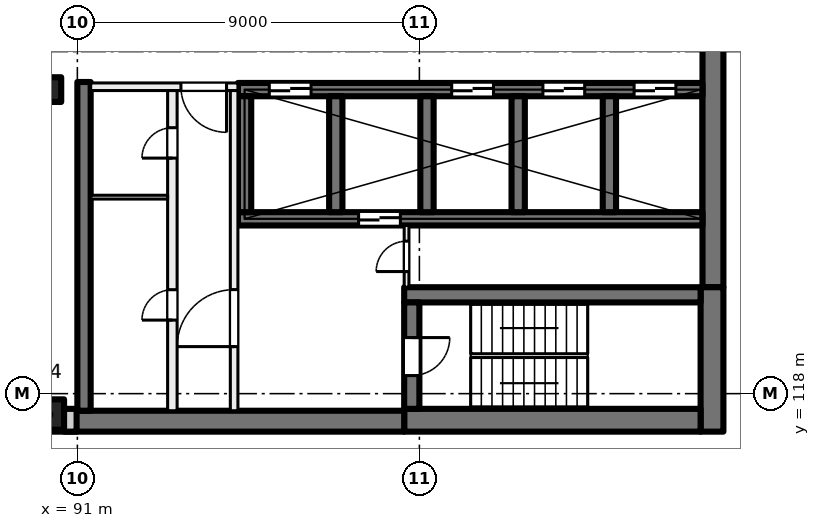
"""IFC4 building model, lengths in metres.
Left out: names, types, materials, properties, quantities, classifications, styles, units other than length and angle.
Written with IfcOpenShell. Run it as: python <this file> out.ifc"""

import sys

from ifc_helpers import new_model, si_unit, direction, frame, frame_2d, origin, origin_2d, place, context, subcontext, project, spatial, rectangle, extrude, element, fill, save


model = new_model("IFC4")
c1 = context("Model", 3, precision=1e-05, world=origin(), true_north=direction((0.0, 1.0)))
c2 = subcontext(c1, "Body", "Model", "MODEL_VIEW")
j1 = project(units=[si_unit("LENGTHUNIT", "METRE"), si_unit("PLANEANGLEUNIT", "RADIAN")], contexts=[c1])
p1 = place(None, origin())
s1 = spatial("IfcSite", under=j1, at=p1, CompositionType="ELEMENT")
p2 = place(p1, origin())
s2 = spatial("IfcBuilding", under=s1, at=p2, CompositionType="ELEMENT")
p3 = place(p2, frame((0.0, 0.0, 154.5)))
s3 = spatial("IfcBuildingStorey", under=s2, at=p3, CompositionType="ELEMENT", Elevation=154.5)
p4 = place(p3, frame((90.25, 126.0, 0.0), z_axis=(0.0, 0.0, 1.0), x_axis=(1.0, 0.0, 0.0)))
e1 = element("IfcColumn", 1, at=p4, inside=s3, PredefinedType="COLUMN", context=c2, shape_type="SweptSolid", body=[
    extrude(rectangle(XDim=0.65, YDim=0.65, at=origin_2d()), origin(), (0.0, 0.0, 1.0), 4.0),
])
p5 = place(p3, frame((90.25, 117.45, 0.0), z_axis=(0.0, 0.0, 1.0), x_axis=(1.0, 0.0, 0.0)))
e2 = element("IfcColumn", 2, at=p5, inside=s3, PredefinedType="COLUMN", context=c2, shape_type="SweptSolid", body=[
    extrude(rectangle(XDim=0.8, YDim=0.8, at=origin_2d()), origin(), (0.0, 0.0, 1.0), 4.0),
])
p6 = place(p3, frame((107.725, 135.2, 0.0), z_axis=(0.0, 0.0, 1.0), x_axis=(0.0, -1.0, 0.0)))
e3 = element("IfcWall", 3, at=p6, inside=s3, PredefinedType="SHEAR", context=c2, shape_type="SweptSolid", body=[
    extrude(rectangle(XDim=14.4, YDim=0.55, at=frame_2d((7.2, 0.0))), origin(), (0.0, 0.0, 1.0), 4.0),
])
p7 = place(p3, frame((107.7, 120.8, 0.0), z_axis=(0.0, 0.0, 1.0), x_axis=(0.0, -1.0, 0.0)))
e4 = element("IfcWall", 4, at=p7, inside=s3, PredefinedType="SHEAR", context=c2, shape_type="SweptSolid", body=[
    extrude(rectangle(XDim=3.8, YDim=0.6, at=frame_2d((1.9, 0.0))), origin(), (0.0, 0.0, 1.0), 4.0),
])
p8 = place(p3, frame((107.4, 117.3, 0.0), z_axis=(0.0, 0.0, 1.0), x_axis=(-1.0, 0.0, 0.0)))
e5 = element("IfcWall", 5, at=p8, inside=s3, PredefinedType="SHEAR", context=c2, shape_type="SweptSolid", body=[
    extrude(rectangle(XDim=7.8, YDim=0.6, at=frame_2d((3.9, 0.0))), origin(), (0.0, 0.0, 1.0), 4.0),
])
p9 = place(p3, frame((99.6, 117.275, 0.0), z_axis=(0.0, 0.0, 1.0), x_axis=(-1.0, 0.0, 0.0)))
e6 = element("IfcWall", 6, at=p9, inside=s3, PredefinedType="SHEAR", context=c2, shape_type="SweptSolid", body=[
    extrude(rectangle(XDim=8.95, YDim=0.55, at=frame_2d((4.475, 0.0))), origin(), (0.0, 0.0, 1.0), 4.0),
])
p10 = place(p3, frame((107.4, 120.6, 0.0), z_axis=(0.0, 0.0, 1.0), x_axis=(-1.0, 0.0, 0.0)))
e7 = element("IfcWall", 7, at=p10, inside=s3, PredefinedType="SHEAR", context=c2, shape_type="SweptSolid", body=[
    extrude(rectangle(XDim=7.8, YDim=0.4, at=frame_2d((3.9, 0.0))), origin(), (0.0, 0.0, 1.0), 4.0),
])
p11 = place(p3, frame((99.8, 120.4, 0.0), z_axis=(0.0, 0.0, 1.0), x_axis=(0.0, -1.0, 0.0)))
e8 = element("IfcWall", 8, at=p11, inside=s3, PredefinedType="SHEAR", context=c2, shape_type="SweptSolid", body=[
    extrude(rectangle(XDim=2.8, YDim=0.4, at=frame_2d((1.4, 0.0))), origin(), (0.0, 0.0, 1.0), 4.0),
])
p12 = place(p11, frame((0.925, 0.0, 0.0)))
e9 = element("IfcOpeningElement", 9, at=p12, cuts=e8, PredefinedType="OPENING", context=c2, shape_type="SweptSolid", body=[
    extrude(rectangle(XDim=1.0, YDim=2.1, at=frame_2d((0.5, 1.05))), frame((0.0, 0.21, 0.0), z_axis=(0.0, -1.0, 0.0), x_axis=(1.0, 0.0, 0.0)), (0.0, 0.0, 1.0), 0.42),
])
p13 = place(p3, frame((107.45, 126.0, 0.0), z_axis=(0.0, 0.0, 1.0), x_axis=(-1.0, 0.0, 0.0)))
e10 = element("IfcWall", 10, at=p13, inside=s3, PredefinedType="SHEAR", context=c2, shape_type="SweptSolid", body=[
    extrude(rectangle(XDim=12.225, YDim=0.35, at=frame_2d((6.112, 0.0))), origin(), (0.0, 0.0, 1.0), 4.0),
])
p14 = place(p13, frame((0.7, 0.0, 0.0)))
e11 = element("IfcOpeningElement", 11, at=p14, cuts=e10, PredefinedType="OPENING", context=c2, shape_type="SweptSolid", body=[
    extrude(rectangle(XDim=1.1, YDim=2.1, at=frame_2d((0.55, 1.05))), frame((0.0, 0.185, 0.0), z_axis=(0.0, -1.0, 0.0), x_axis=(1.0, 0.0, 0.0)), (0.0, 0.0, 1.0), 0.37),
])
p15 = place(p13, frame((3.1, 0.0, 0.0)))
e12 = element("IfcOpeningElement", 12, at=p15, cuts=e10, PredefinedType="OPENING", context=c2, shape_type="SweptSolid", body=[
    extrude(rectangle(XDim=1.1, YDim=2.1, at=frame_2d((0.55, 1.05))), frame((0.0, 0.185, 0.0), z_axis=(0.0, -1.0, 0.0), x_axis=(1.0, 0.0, 0.0)), (0.0, 0.0, 1.0), 0.37),
])
p16 = place(p13, frame((5.5, 0.0, 0.0)))
e13 = element("IfcOpeningElement", 13, at=p16, cuts=e10, PredefinedType="OPENING", context=c2, shape_type="SweptSolid", body=[
    extrude(rectangle(XDim=1.1, YDim=2.1, at=frame_2d((0.55, 1.05))), frame((0.0, 0.185, 0.0), z_axis=(0.0, -1.0, 0.0), x_axis=(1.0, 0.0, 0.0)), (0.0, 0.0, 1.0), 0.37),
])
p17 = place(p13, frame((10.3, 0.0, 0.0)))
e14 = element("IfcOpeningElement", 14, at=p17, cuts=e10, PredefinedType="OPENING", context=c2, shape_type="SweptSolid", body=[
    extrude(rectangle(XDim=1.1, YDim=2.1, at=frame_2d((0.55, 1.05))), frame((0.0, 0.185, 0.0), z_axis=(0.0, -1.0, 0.0), x_axis=(1.0, 0.0, 0.0)), (0.0, 0.0, 1.0), 0.37),
])
p18 = place(p3, frame((107.45, 122.6, 0.0), z_axis=(0.0, 0.0, 1.0), x_axis=(-1.0, 0.0, 0.0)))
e15 = element("IfcWall", 15, at=p18, inside=s3, PredefinedType="SHEAR", context=c2, shape_type="SweptSolid", body=[
    extrude(rectangle(XDim=12.225, YDim=0.35, at=frame_2d((6.112, 0.0))), origin(), (0.0, 0.0, 1.0), 4.0),
])
p19 = place(p18, frame((7.95, 0.0, 0.0)))
e16 = element("IfcOpeningElement", 16, at=p19, cuts=e15, PredefinedType="OPENING", context=c2, shape_type="SweptSolid", body=[
    extrude(rectangle(XDim=1.1, YDim=2.1, at=frame_2d((0.55, 1.05))), frame((0.0, 0.185, 0.0), z_axis=(0.0, -1.0, 0.0), x_axis=(1.0, 0.0, 0.0)), (0.0, 0.0, 1.0), 0.37),
])
for number, where, z_axis, x_axis in (
    (17, (105.0, 125.825, 0.0), (0.0, 0.0, 1.0), (0.0, -1.0, 0.0)),
    (18, (102.6, 125.825, 0.0), (0.0, 0.0, 1.0), (0.0, -1.0, 0.0)),
    (19, (100.2, 125.825, 0.0), (0.0, 0.0, 1.0), (0.0, -1.0, 0.0)),
    (20, (97.8, 125.825, 0.0), (0.0, 0.0, 1.0), (0.0, -1.0, 0.0)),
    (21, (95.4, 125.825, 0.0), (0.0, 0.0, 1.0), (0.0, -1.0, 0.0)),
):
    element("IfcWall", number, at=place(p3, frame(where, z_axis=z_axis, x_axis=x_axis)), inside=s3, PredefinedType="SHEAR", context=c2, shape_type="SweptSolid", body=[
        extrude(rectangle(XDim=3.05, YDim=0.35, at=frame_2d((1.525, 0.0))), origin(), (0.0, 0.0, 1.0), 4.0),
    ])
p20 = place(p3, frame((91.175, 126.2, 0.0), z_axis=(0.0, 0.0, 1.0), x_axis=(0.0, -1.0, 0.0)))
e22 = element("IfcWall", 22, at=p20, inside=s3, PredefinedType="SHEAR", context=c2, shape_type="SweptSolid", body=[
    extrude(rectangle(XDim=8.65, YDim=0.35, at=frame_2d((4.325, 0.0))), origin(), (0.0, 0.0, 1.0), 4.0),
])
p21 = place(p3, frame((90.98, 117.3, 0.0), z_axis=(0.0, 0.0, 1.0), x_axis=(-1.0, 0.0, 0.0)))
e23 = element("IfcWall", 23, at=p21, inside=s3, PredefinedType="SOLIDWALL", context=c2, shape_type="SweptSolid", body=[
    extrude(rectangle(XDim=33.745, YDim=0.6, at=frame_2d((16.873, 0.0))), origin(), (0.0, 0.0, 1.0), 3.625),
])
p22 = place(p21, frame((1.48, 0.0, 0.9)))
e24 = element("IfcOpeningElement", 24, at=p22, cuts=e23, PredefinedType="OPENING", context=c2, shape_type="SweptSolid", body=[
    extrude(rectangle(XDim=3.0, YDim=2.4, at=frame_2d((1.5, 1.2))), frame((0.0, 0.31, 0.0), z_axis=(0.0, -1.0, 0.0), x_axis=(1.0, 0.0, 0.0)), (0.0, 0.0, 1.0), 0.62),
])
p23 = place(p21, frame((5.98, 0.0, 0.9)))
e25 = element("IfcOpeningElement", 25, at=p23, cuts=e23, PredefinedType="OPENING", context=c2, shape_type="SweptSolid", body=[
    extrude(rectangle(XDim=3.0, YDim=2.4, at=frame_2d((1.5, 1.2))), frame((0.0, 0.31, 0.0), z_axis=(0.0, -1.0, 0.0), x_axis=(1.0, 0.0, 0.0)), (0.0, 0.0, 1.0), 0.62),
])
p24 = place(p21, frame((10.48, 0.0, 0.9)))
e26 = element("IfcOpeningElement", 26, at=p24, cuts=e23, PredefinedType="OPENING", context=c2, shape_type="SweptSolid", body=[
    extrude(rectangle(XDim=3.0, YDim=2.4, at=frame_2d((1.5, 1.2))), frame((0.0, 0.31, 0.0), z_axis=(0.0, -1.0, 0.0), x_axis=(1.0, 0.0, 0.0)), (0.0, 0.0, 1.0), 0.62),
])
p25 = place(p21, frame((14.98, 0.0, 0.9)))
e27 = element("IfcOpeningElement", 27, at=p25, cuts=e23, PredefinedType="OPENING", context=c2, shape_type="SweptSolid", body=[
    extrude(rectangle(XDim=3.0, YDim=2.4, at=frame_2d((1.5, 1.2))), frame((0.0, 0.31, 0.0), z_axis=(0.0, -1.0, 0.0), x_axis=(1.0, 0.0, 0.0)), (0.0, 0.0, 1.0), 0.62),
])
p26 = place(p21, frame((19.48, 0.0, 0.9)))
e28 = element("IfcOpeningElement", 28, at=p26, cuts=e23, PredefinedType="OPENING", context=c2, shape_type="SweptSolid", body=[
    extrude(rectangle(XDim=3.0, YDim=2.4, at=frame_2d((1.5, 1.2))), frame((0.0, 0.31, 0.0), z_axis=(0.0, -1.0, 0.0), x_axis=(1.0, 0.0, 0.0)), (0.0, 0.0, 1.0), 0.62),
])
p27 = place(p21, frame((24.58, 0.0, 0.0)))
e29 = element("IfcOpeningElement", 29, at=p27, cuts=e23, PredefinedType="OPENING", context=c2, shape_type="SweptSolid", body=[
    extrude(rectangle(XDim=1.8, YDim=2.4, at=frame_2d((0.9, 1.2))), frame((0.0, 0.31, 0.0), z_axis=(0.0, -1.0, 0.0), x_axis=(1.0, 0.0, 0.0)), (0.0, 0.0, 1.0), 0.62),
])
p28 = place(p21, frame((28.48, 0.0, 0.9)))
e30 = element("IfcOpeningElement", 30, at=p28, cuts=e23, PredefinedType="OPENING", context=c2, shape_type="SweptSolid", body=[
    extrude(rectangle(XDim=3.0, YDim=2.4, at=frame_2d((1.5, 1.2))), frame((0.0, 0.31, 0.0), z_axis=(0.0, -1.0, 0.0), x_axis=(1.0, 0.0, 0.0)), (0.0, 0.0, 1.0), 0.62),
])
p29 = place(p3, frame((95.225, 126.075, 0.0), z_axis=(0.0, 0.0, 1.0), x_axis=(-1.0, 0.0, 0.0)))
e31 = element("IfcWall", 31, at=p29, inside=s3, PredefinedType="PARTITIONING", context=c2, shape_type="SweptSolid", body=[
    extrude(rectangle(XDim=3.875, YDim=0.2, at=frame_2d((1.938, 0.0))), origin(), (0.0, 0.0, 1.0), 3.625),
])
p30 = place(p29, frame((0.3, 0.0, 0.0)))
e32 = element("IfcOpeningElement", 32, at=p30, cuts=e31, PredefinedType="OPENING", context=c2, shape_type="SweptSolid", body=[
    extrude(rectangle(XDim=1.2, YDim=2.1, at=frame_2d((0.6, 1.05))), frame((0.0, 0.11, 0.0), z_axis=(0.0, -1.0, 0.0), x_axis=(1.0, 0.0, 0.0)), (0.0, 0.0, 1.0), 0.22),
])
p31 = place(p3, frame((95.125, 117.55, 0.0), z_axis=(0.0, 0.0, 1.0), x_axis=(0.0, 1.0, 0.0)))
e33 = element("IfcWall", 33, at=p31, inside=s3, PredefinedType="PARTITIONING", context=c2, shape_type="SweptSolid", body=[
    extrude(rectangle(XDim=8.425, YDim=0.2, at=frame_2d((4.212, 0.0))), origin(), (0.0, 0.0, 1.0), 3.625),
])
p32 = place(p31, frame((1.688, 0.0, 0.0)))
e34 = element("IfcOpeningElement", 34, at=p32, cuts=e33, PredefinedType="OPENING", context=c2, shape_type="SweptSolid", body=[
    extrude(rectangle(XDim=1.5, YDim=2.1, at=frame_2d((0.75, 1.05))), frame((0.0, 0.11, 0.0), z_axis=(0.0, -1.0, 0.0), x_axis=(1.0, 0.0, 0.0)), (0.0, 0.0, 1.0), 0.22),
])
p33 = place(p3, frame((93.5, 117.55, 0.0), z_axis=(0.0, 0.0, 1.0), x_axis=(0.0, 1.0, 0.0)))
e35 = element("IfcWall", 35, at=p33, inside=s3, PredefinedType="PARTITIONING", context=c2, shape_type="SweptSolid", body=[
    extrude(rectangle(XDim=8.425, YDim=0.25, at=frame_2d((4.212, 0.0))), origin(), (0.0, 0.0, 1.0), 3.625),
])
p34 = place(p33, frame((6.647, 0.0, 0.0)))
e36 = element("IfcOpeningElement", 36, at=p34, cuts=e35, PredefinedType="OPENING", context=c2, shape_type="SweptSolid", body=[
    extrude(rectangle(XDim=0.8, YDim=2.1, at=frame_2d((0.4, 1.05))), frame((0.0, 0.135, 0.0), z_axis=(0.0, -1.0, 0.0), x_axis=(1.0, 0.0, 0.0)), (0.0, 0.0, 1.0), 0.27),
])
p35 = place(p33, frame((2.385, 0.0, 0.0)))
e37 = element("IfcOpeningElement", 37, at=p35, cuts=e35, PredefinedType="OPENING", context=c2, shape_type="SweptSolid", body=[
    extrude(rectangle(XDim=0.8, YDim=2.1, at=frame_2d((0.4, 1.05))), frame((0.0, 0.135, 0.0), z_axis=(0.0, -1.0, 0.0), x_axis=(1.0, 0.0, 0.0)), (0.0, 0.0, 1.0), 0.27),
])
p36 = place(p3, frame((99.663, 120.8, 0.0), z_axis=(0.0, 0.0, 1.0), x_axis=(0.0, 1.0, 0.0)))
e38 = element("IfcWall", 38, at=p36, inside=s3, PredefinedType="PARTITIONING", context=c2, shape_type="SweptSolid", body=[
    extrude(rectangle(XDim=1.625, YDim=0.125, at=frame_2d((0.812, 0.0))), origin(), (0.0, 0.0, 1.0), 3.625),
])
p37 = place(p36, frame((0.413, 0.0, 0.0)))
e39 = element("IfcOpeningElement", 39, at=p37, cuts=e38, PredefinedType="OPENING", context=c2, shape_type="SweptSolid", body=[
    extrude(rectangle(XDim=0.8, YDim=2.1, at=frame_2d((0.4, 1.05))), frame((0.0, 0.073, 0.0), z_axis=(0.0, -1.0, 0.0), x_axis=(1.0, 0.0, 0.0)), (0.0, 0.0, 1.0), 0.145),
])
p38 = place(p3, frame((93.375, 123.17, 0.0), z_axis=(0.0, 0.0, 1.0), x_axis=(-1.0, 0.0, 0.0)))
e40 = element("IfcWall", 40, at=p38, inside=s3, PredefinedType="PARTITIONING", context=c2, shape_type="SweptSolid", body=[
    extrude(rectangle(XDim=2.025, YDim=0.1, at=frame_2d((1.012, 0.0))), origin(), (0.0, 0.0, 1.0), 3.625),
])
p39 = place(p14, origin())
e41 = element("IfcDoor", 41, at=p39, inside=s3, OperationType="DOUBLE_DOOR_SLIDING", PredefinedType="DOOR", context=c2, shape_type="SweptSolid", body=[
    extrude(rectangle(XDim=1.1, YDim=2.1, at=frame_2d((0.55, 1.05))), frame((0.0, 0.025, 0.0), z_axis=(0.0, -1.0, 0.0), x_axis=(1.0, 0.0, 0.0)), (0.0, 0.0, 1.0), 0.05),
])
fill(e11, e41)
p40 = place(p15, origin())
e42 = element("IfcDoor", 42, at=p40, inside=s3, OperationType="DOUBLE_DOOR_SLIDING", PredefinedType="DOOR", context=c2, shape_type="SweptSolid", body=[
    extrude(rectangle(XDim=1.1, YDim=2.1, at=frame_2d((0.55, 1.05))), frame((0.0, 0.025, 0.0), z_axis=(0.0, -1.0, 0.0), x_axis=(1.0, 0.0, 0.0)), (0.0, 0.0, 1.0), 0.05),
])
fill(e12, e42)
p41 = place(p16, origin())
e43 = element("IfcDoor", 43, at=p41, inside=s3, OperationType="DOUBLE_DOOR_SLIDING", PredefinedType="DOOR", context=c2, shape_type="SweptSolid", body=[
    extrude(rectangle(XDim=1.1, YDim=2.1, at=frame_2d((0.55, 1.05))), frame((0.0, 0.025, 0.0), z_axis=(0.0, -1.0, 0.0), x_axis=(1.0, 0.0, 0.0)), (0.0, 0.0, 1.0), 0.05),
])
fill(e13, e43)
p42 = place(p17, origin())
e44 = element("IfcDoor", 44, at=p42, inside=s3, OperationType="DOUBLE_DOOR_SLIDING", PredefinedType="DOOR", context=c2, shape_type="SweptSolid", body=[
    extrude(rectangle(XDim=1.1, YDim=2.1, at=frame_2d((0.55, 1.05))), frame((0.0, 0.025, 0.0), z_axis=(0.0, -1.0, 0.0), x_axis=(1.0, 0.0, 0.0)), (0.0, 0.0, 1.0), 0.05),
])
fill(e14, e44)
p43 = place(p30, origin())
e45 = element("IfcDoor", 45, at=p43, inside=s3, OperationType="DOUBLE_DOOR_SINGLE_SWING", PredefinedType="DOOR", context=c2, shape_type="SweptSolid", body=[
    extrude(rectangle(XDim=1.2, YDim=2.1, at=frame_2d((0.6, 1.05))), frame((0.0, 0.025, 0.0), z_axis=(0.0, -1.0, 0.0), x_axis=(1.0, 0.0, 0.0)), (0.0, 0.0, 1.0), 0.05),
])
fill(e32, e45)
p44 = place(p32, origin())
e46 = element("IfcDoor", 46, at=p44, inside=s3, OperationType="DOUBLE_DOOR_SINGLE_SWING", PredefinedType="DOOR", context=c2, shape_type="SweptSolid", body=[
    extrude(rectangle(XDim=1.5, YDim=2.1, at=frame_2d((0.75, 1.05))), frame((0.0, 0.025, 0.0), z_axis=(0.0, -1.0, 0.0), x_axis=(1.0, 0.0, 0.0)), (0.0, 0.0, 1.0), 0.05),
])
fill(e34, e46)
p45 = place(p12, origin())
e47 = element("IfcDoor", 47, at=p45, inside=s3, OperationType="SINGLE_SWING_LEFT", PredefinedType="DOOR", context=c2, shape_type="SweptSolid", body=[
    extrude(rectangle(XDim=1.0, YDim=2.1, at=frame_2d((0.5, 1.05))), frame((0.0, 0.025, 0.0), z_axis=(0.0, -1.0, 0.0), x_axis=(1.0, 0.0, 0.0)), (0.0, 0.0, 1.0), 0.05),
])
fill(e9, e47)
p46 = place(p37, origin())
e48 = element("IfcDoor", 48, at=p46, inside=s3, OperationType="SINGLE_SWING_RIGHT", PredefinedType="DOOR", context=c2, shape_type="SweptSolid", body=[
    extrude(rectangle(XDim=0.8, YDim=2.1, at=frame_2d((0.4, 1.05))), frame((0.0, 0.025, 0.0), z_axis=(0.0, -1.0, 0.0), x_axis=(1.0, 0.0, 0.0)), (0.0, 0.0, 1.0), 0.05),
])
fill(e39, e48)
p47 = place(p34, origin())
e49 = element("IfcDoor", 49, at=p47, inside=s3, OperationType="SINGLE_SWING_LEFT", PredefinedType="DOOR", context=c2, shape_type="SweptSolid", body=[
    extrude(rectangle(XDim=0.8, YDim=2.1, at=frame_2d((0.4, 1.05))), frame((0.0, 0.025, 0.0), z_axis=(0.0, -1.0, 0.0), x_axis=(1.0, 0.0, 0.0)), (0.0, 0.0, 1.0), 0.05),
])
fill(e36, e49)
p48 = place(p35, origin())
e50 = element("IfcDoor", 50, at=p48, inside=s3, OperationType="SINGLE_SWING_RIGHT", PredefinedType="DOOR", context=c2, shape_type="SweptSolid", body=[
    extrude(rectangle(XDim=0.8, YDim=2.1, at=frame_2d((0.4, 1.05))), frame((0.0, 0.025, 0.0), z_axis=(0.0, -1.0, 0.0), x_axis=(1.0, 0.0, 0.0)), (0.0, 0.0, 1.0), 0.05),
])
fill(e37, e50)
p49 = place(p19, origin())
e51 = element("IfcDoor", 51, at=p49, inside=s3, OperationType="DOUBLE_DOOR_SLIDING", PredefinedType="DOOR", context=c2, shape_type="SweptSolid", body=[
    extrude(rectangle(XDim=1.1, YDim=2.1, at=frame_2d((0.55, 1.05))), frame((0.0, 0.025, 0.0), z_axis=(0.0, -1.0, 0.0), x_axis=(1.0, 0.0, 0.0)), (0.0, 0.0, 1.0), 0.05),
])
fill(e16, e51)
save(model, sys.argv[1])
